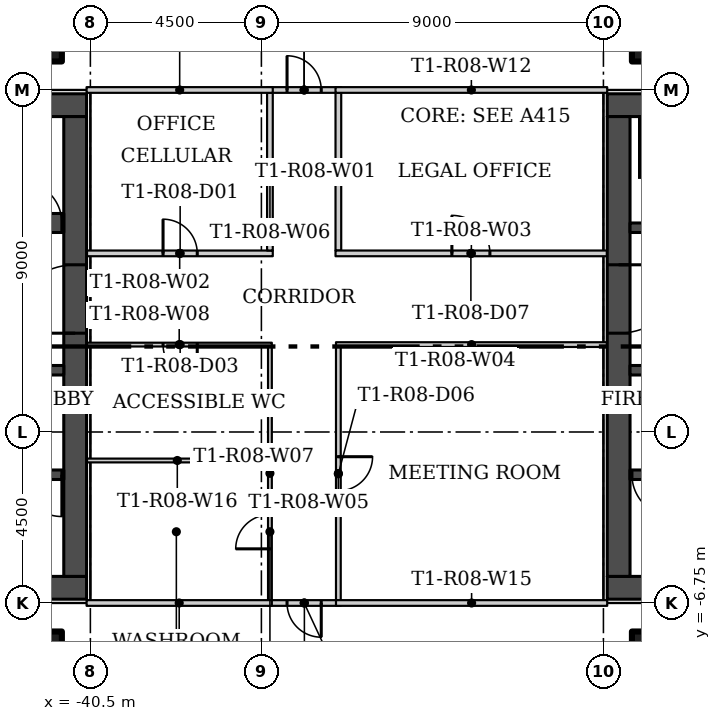
"""IFC4 building model, lengths in metres.
Left out: names, types, materials, properties, quantities, classifications, styles, units other than length and angle.
Written with IfcOpenShell. Run it as: python <this file> out.ifc"""

import sys

from ifc_helpers import new_model, si_unit, direction, frame, frame_2d, origin, origin_2d, place, context, subcontext, project, spatial, rectangle, hollow_rectangle, extrude, element, fill, save


model = new_model("IFC4")
c1 = context("Model", 3, precision=1e-05, world=origin(), true_north=direction((0.0, 1.0)))
c2 = subcontext(c1, "Body", "Model", "MODEL_VIEW")
j1 = project(units=[si_unit("LENGTHUNIT", "METRE"), si_unit("PLANEANGLEUNIT", "RADIAN")], contexts=[c1])
p1 = place(None, origin())
s1 = spatial("IfcSite", under=j1, at=p1, CompositionType="ELEMENT")
p2 = place(p1, origin())
s2 = spatial("IfcBuilding", under=s1, at=p2, CompositionType="ELEMENT")
p3 = place(p2, frame((0.0, 0.0, 85.8)))
s3 = spatial("IfcBuildingStorey", under=s2, at=p3, CompositionType="ELEMENT", Elevation=85.8)
for number, where in (
    (1, (-25.625, 8.125, 0.0)),
    (2, (-25.625, -8.125, 0.0)),
    (3, (-41.875, 8.125, 0.0)),
    (4, (-41.875, -8.125, 0.0)),
):
    element("IfcColumn", number, at=place(p3, frame(where)), inside=s3, PredefinedType="COLUMN", context=c2, shape_type="SweptSolid", body=[
        extrude(hollow_rectangle(XDim=1.25, YDim=1.25, WallThickness=0.05, at=origin_2d()), origin(), (0.0, 0.0, 1.0), 3.55),
    ])
p4 = place(p3, frame((-33.975, 6.675, 0.0), z_axis=(0.0, 0.0, 1.0), x_axis=(0.0, -1.0, 0.0)))
e5 = element("IfcWall", 5, at=p4, inside=s3, PredefinedType="PARTITIONING", context=c2, shape_type="SweptSolid", body=[
    extrude(rectangle(XDim=4.15, YDim=0.15, at=frame_2d((2.075, 0.0))), origin(), (0.0, 0.0, 1.0), 3.55),
])
p5 = place(p3, frame((-40.6, 2.45, 0.0)))
e6 = element("IfcWall", 6, at=p5, inside=s3, PredefinedType="PARTITIONING", context=c2, shape_type="SweptSolid", body=[
    extrude(rectangle(XDim=4.9, YDim=0.15, at=frame_2d((2.45, 0.0))), origin(), (0.0, 0.0, 1.0), 3.55),
])
p6 = place(p5, frame((2.012, 0.0, 0.0)))
e7 = element("IfcOpeningElement", 7, at=p6, cuts=e6, PredefinedType="OPENING", context=c2, shape_type="SweptSolid", body=[
    extrude(rectangle(XDim=0.9, YDim=2.1, at=frame_2d((0.45, 1.05))), frame((0.0, 0.085, 0.0), z_axis=(0.0, -1.0, 0.0), x_axis=(1.0, 0.0, 0.0)), (0.0, 0.0, 1.0), 0.17),
])
p7 = place(p3, frame((-34.05, 2.45, 0.0)))
e8 = element("IfcWall", 8, at=p7, inside=s3, PredefinedType="PARTITIONING", context=c2, shape_type="SweptSolid", body=[
    extrude(rectangle(XDim=7.15, YDim=0.15, at=frame_2d((3.575, 0.0))), origin(), (0.0, 0.0, 1.0), 3.55),
])
p8 = place(p7, frame((3.062, 0.0, 0.0)))
e9 = element("IfcOpeningElement", 9, at=p8, cuts=e8, PredefinedType="OPENING", context=c2, shape_type="SweptSolid", body=[
    extrude(rectangle(XDim=1.0, YDim=2.4, at=frame_2d((0.5, 1.2))), frame((0.0, 0.085, 0.0), z_axis=(0.0, -1.0, 0.0), x_axis=(1.0, 0.0, 0.0)), (0.0, 0.0, 1.0), 0.17),
])
p9 = place(p3, frame((-26.9, 0.05, 0.0), z_axis=(0.0, 0.0, 1.0), x_axis=(-1.0, 0.0, 0.0)))
e10 = element("IfcWall", 10, at=p9, inside=s3, PredefinedType="PARTITIONING", context=c2, shape_type="SweptSolid", body=[
    extrude(rectangle(XDim=7.137, YDim=0.125, at=frame_2d((3.569, 0.0))), origin(), (0.0, 0.0, 1.0), 3.55),
])
p10 = place(p3, frame((-33.975, -0.013, 0.0), z_axis=(0.0, 0.0, 1.0), x_axis=(0.0, -1.0, 0.0)))
e11 = element("IfcWall", 11, at=p10, inside=s3, PredefinedType="PARTITIONING", context=c2, shape_type="SweptSolid", body=[
    extrude(rectangle(XDim=6.662, YDim=0.125, at=frame_2d((3.331, 0.0))), origin(), (0.0, 0.0, 1.0), 3.55),
])
p11 = place(p10, frame((2.887, 0.0, 0.0)))
e12 = element("IfcOpeningElement", 12, at=p11, cuts=e11, PredefinedType="OPENING", context=c2, shape_type="SweptSolid", body=[
    extrude(rectangle(XDim=0.9, YDim=2.1, at=frame_2d((0.45, 1.05))), frame((0.0, 0.073, 0.0), z_axis=(0.0, -1.0, 0.0), x_axis=(1.0, 0.0, 0.0)), (0.0, 0.0, 1.0), 0.145),
])
p12 = place(p3, frame((-35.775, 2.525, 0.0), z_axis=(0.0, 0.0, 1.0), x_axis=(0.0, 1.0, 0.0)))
e13 = element("IfcWall", 13, at=p12, inside=s3, PredefinedType="PARTITIONING", context=c2, shape_type="SweptSolid", body=[
    extrude(rectangle(XDim=4.15, YDim=0.15, at=frame_2d((2.075, 0.0))), origin(), (0.0, 0.0, 1.0), 3.55),
])
p13 = place(p3, frame((-35.775, -6.675, 0.0), z_axis=(0.0, 0.0, 1.0), x_axis=(0.0, 1.0, 0.0)))
e14 = element("IfcWall", 14, at=p13, inside=s3, PredefinedType="PARTITIONING", context=c2, shape_type="SweptSolid", body=[
    extrude(rectangle(XDim=6.675, YDim=0.1, at=frame_2d((3.337, 0.0))), origin(), (0.0, 0.0, 1.0), 3.55),
])
p14 = place(p13, frame((1.35, 0.0, 0.0)))
e15 = element("IfcOpeningElement", 15, at=p14, cuts=e14, PredefinedType="OPENING", context=c2, shape_type="SweptSolid", body=[
    extrude(rectangle(XDim=0.9, YDim=2.1, at=frame_2d((0.45, 1.05))), frame((0.0, 0.06, 0.0), z_axis=(0.0, -1.0, 0.0), x_axis=(1.0, 0.0, 0.0)), (0.0, 0.0, 1.0), 0.12),
])
p15 = place(p3, frame((-35.725, 0.05, 0.0), z_axis=(0.0, 0.0, 1.0), x_axis=(-1.0, 0.0, 0.0)))
e16 = element("IfcWall", 16, at=p15, inside=s3, PredefinedType="PARTITIONING", context=c2, shape_type="SweptSolid", body=[
    extrude(rectangle(XDim=4.875, YDim=0.1, at=frame_2d((2.438, 0.0))), origin(), (0.0, 0.0, 1.0), 3.55),
])
p16 = place(p15, frame((1.962, 0.0, 0.0)))
e17 = element("IfcOpeningElement", 17, at=p16, cuts=e16, PredefinedType="OPENING", context=c2, shape_type="SweptSolid", body=[
    extrude(rectangle(XDim=0.9, YDim=2.1, at=frame_2d((0.45, 1.05))), frame((0.0, 0.06, 0.0), z_axis=(0.0, -1.0, 0.0), x_axis=(1.0, 0.0, 0.0)), (0.0, 0.0, 1.0), 0.12),
])
p17 = place(p3, frame((-35.85, 6.75, 0.0)))
e18 = element("IfcWall", 18, at=p17, inside=s3, PredefinedType="PARTITIONING", context=c2, shape_type="SweptSolid", body=[
    extrude(rectangle(XDim=1.951, YDim=0.15, at=frame_2d((0.975, 0.0))), origin(), (0.0, 0.0, 1.0), 3.55),
])
p18 = place(p17, frame((0.525, 0.0, 0.0)))
e19 = element("IfcOpeningElement", 19, at=p18, cuts=e18, PredefinedType="OPENING", context=c2, shape_type="SweptSolid", body=[
    extrude(rectangle(XDim=0.9, YDim=2.1, at=frame_2d((0.45, 1.05))), frame((0.0, 0.085, 0.0), z_axis=(0.0, -1.0, 0.0), x_axis=(1.0, 0.0, 0.0)), (0.0, 0.0, 1.0), 0.17),
])
p19 = place(p3, frame((-33.912, -6.75, 0.0), z_axis=(0.0, 0.0, 1.0), x_axis=(-1.0, 0.0, 0.0)))
e20 = element("IfcWall", 20, at=p19, inside=s3, PredefinedType="PARTITIONING", context=c2, shape_type="SweptSolid", body=[
    extrude(rectangle(XDim=1.913, YDim=0.15, at=frame_2d((0.957, 0.0))), origin(), (0.0, 0.0, 1.0), 3.55),
])
p20 = place(p19, frame((0.513, 0.0, 0.0)))
e21 = element("IfcOpeningElement", 21, at=p20, cuts=e20, PredefinedType="OPENING", context=c2, shape_type="SweptSolid", body=[
    extrude(rectangle(XDim=0.9, YDim=2.1, at=frame_2d((0.45, 1.05))), frame((0.0, 0.085, 0.0), z_axis=(0.0, -1.0, 0.0), x_axis=(1.0, 0.0, 0.0)), (0.0, 0.0, 1.0), 0.17),
])
p21 = place(p3, frame((-26.9, 6.75, 0.0), z_axis=(0.0, 0.0, 1.0), x_axis=(-1.0, 0.0, 0.0)))
e22 = element("IfcWall", 22, at=p21, inside=s3, PredefinedType="PARTITIONING", context=c2, shape_type="SweptSolid", body=[
    extrude(rectangle(XDim=7.15, YDim=0.15, at=frame_2d((3.575, 0.0))), origin(), (0.0, 0.0, 1.0), 3.55),
])
p22 = place(p3, frame((-35.7, 6.75, 0.0), z_axis=(0.0, 0.0, 1.0), x_axis=(-1.0, 0.0, 0.0)))
e23 = element("IfcWall", 23, at=p22, inside=s3, PredefinedType="PARTITIONING", context=c2, shape_type="SweptSolid", body=[
    extrude(rectangle(XDim=4.9, YDim=0.15, at=frame_2d((2.45, 0.0))), origin(), (0.0, 0.0, 1.0), 3.55),
])
p23 = place(p3, frame((-40.6, -6.75, 0.0)))
e24 = element("IfcWall", 24, at=p23, inside=s3, PredefinedType="PARTITIONING", context=c2, shape_type="SweptSolid", body=[
    extrude(rectangle(XDim=4.875, YDim=0.15, at=frame_2d((2.438, 0.0))), origin(), (0.0, 0.0, 1.0), 3.55),
])
p24 = place(p3, frame((-34.037, -6.75, 0.0)))
e25 = element("IfcWall", 25, at=p24, inside=s3, PredefinedType="PARTITIONING", context=c2, shape_type="SweptSolid", body=[
    extrude(rectangle(XDim=7.137, YDim=0.15, at=frame_2d((3.569, 0.0))), origin(), (0.0, 0.0, 1.0), 3.55),
])
p25 = place(p3, frame((-35.825, -3.0, 0.0), z_axis=(0.0, 0.0, 1.0), x_axis=(-1.0, 0.0, 0.0)))
e26 = element("IfcWall", 26, at=p25, inside=s3, PredefinedType="PARTITIONING", context=c2, shape_type="SweptSolid", body=[
    extrude(rectangle(XDim=4.775, YDim=0.1, at=frame_2d((2.387, 0.0))), origin(), (0.0, 0.0, 1.0), 3.55),
])
for number, where in (
    (27, (-26.9, -6.35, 0.0)),
    (28, (-26.9, 6.35, 0.0)),
):
    element("IfcWall", number, at=place(p3, frame(where)), inside=s3, PredefinedType="SHEAR", context=c2, shape_type="SweptSolid", body=[
        extrude(rectangle(XDim=13.3, YDim=0.6, at=frame_2d((6.65, 0.0))), origin(), (0.0, 0.0, 1.0), 3.55),
    ])
p26 = place(p3, frame((-26.6, 6.05, 0.0), z_axis=(0.0, 0.0, 1.0), x_axis=(0.0, -1.0, 0.0)))
e29 = element("IfcWall", 29, at=p26, inside=s3, PredefinedType="SHEAR", context=c2, shape_type="SweptSolid", body=[
    extrude(rectangle(XDim=12.1, YDim=0.6, at=frame_2d((6.05, 0.0))), origin(), (0.0, 0.0, 1.0), 3.55),
])
p27 = place(p26, frame((3.9, 0.0, 0.0)))
e30 = element("IfcOpeningElement", 30, at=p27, cuts=e29, PredefinedType="OPENING", context=c2, shape_type="SweptSolid", body=[
    extrude(rectangle(XDim=1.8, YDim=2.4, at=frame_2d((0.9, 1.2))), frame((0.0, 0.31, 0.0), z_axis=(0.0, -1.0, 0.0), x_axis=(1.0, 0.0, 0.0)), (0.0, 0.0, 1.0), 0.62),
])
p28 = place(p3, frame((-14.2, -3.375, 0.0), z_axis=(0.0, 0.0, 1.0), x_axis=(-1.0, 0.0, 0.0)))
e31 = element("IfcWall", 31, at=p28, inside=s3, PredefinedType="SHEAR", context=c2, shape_type="SweptSolid", body=[
    extrude(rectangle(XDim=12.1, YDim=0.25, at=frame_2d((6.05, 0.0))), origin(), (0.0, 0.0, 1.0), 3.55),
])
p29 = place(p28, frame((10.95, 0.0, 0.0)))
e32 = element("IfcOpeningElement", 32, at=p29, cuts=e31, PredefinedType="OPENING", context=c2, shape_type="SweptSolid", body=[
    extrude(rectangle(XDim=1.1, YDim=2.1, at=frame_2d((0.55, 1.05))), frame((0.0, 0.135, 0.0), z_axis=(0.0, -1.0, 0.0), x_axis=(1.0, 0.0, 0.0)), (0.0, 0.0, 1.0), 0.27),
])
p30 = place(p3, frame((-14.2, -0.625, 0.0), z_axis=(0.0, 0.0, 1.0), x_axis=(-1.0, 0.0, 0.0)))
e33 = element("IfcWall", 33, at=p30, inside=s3, PredefinedType="SHEAR", context=c2, shape_type="SweptSolid", body=[
    extrude(rectangle(XDim=12.1, YDim=0.25, at=frame_2d((6.05, 0.0))), origin(), (0.0, 0.0, 1.0), 3.55),
])
p31 = place(p30, frame((8.65, 0.0, 0.0)))
e34 = element("IfcOpeningElement", 34, at=p31, cuts=e33, PredefinedType="OPENING", context=c2, shape_type="SweptSolid", body=[
    extrude(rectangle(XDim=1.2, YDim=2.1, at=frame_2d((0.6, 1.05))), frame((0.0, 0.135, 0.0), z_axis=(0.0, -1.0, 0.0), x_axis=(1.0, 0.0, 0.0)), (0.0, 0.0, 1.0), 0.27),
])
p32 = place(p30, frame((2.0, 0.0, 0.0)))
e35 = element("IfcOpeningElement", 35, at=p32, cuts=e33, PredefinedType="OPENING", context=c2, shape_type="SweptSolid", body=[
    extrude(rectangle(XDim=0.9, YDim=2.1, at=frame_2d((0.45, 1.05))), frame((0.0, 0.135, 0.0), z_axis=(0.0, -1.0, 0.0), x_axis=(1.0, 0.0, 0.0)), (0.0, 0.0, 1.0), 0.27),
])
p33 = place(p30, frame((0.375, 0.0, 0.0)))
e36 = element("IfcOpeningElement", 36, at=p33, cuts=e33, PredefinedType="OPENING", context=c2, shape_type="SweptSolid", body=[
    extrude(rectangle(XDim=0.9, YDim=2.1, at=frame_2d((0.45, 1.05))), frame((0.0, 0.135, 0.0), z_axis=(0.0, -1.0, 0.0), x_axis=(1.0, 0.0, 0.0)), (0.0, 0.0, 1.0), 0.27),
])
p34 = place(p3, frame((-26.3, 3.125, 0.0)))
e37 = element("IfcWall", 37, at=p34, inside=s3, PredefinedType="SHEAR", context=c2, shape_type="SweptSolid", body=[
    extrude(rectangle(XDim=12.1, YDim=0.25, at=frame_2d((6.05, 0.0))), origin(), (0.0, 0.0, 1.0), 3.55),
])
p35 = place(p34, frame((0.85, 0.0, 0.0)))
e38 = element("IfcOpeningElement", 38, at=p35, cuts=e37, PredefinedType="OPENING", context=c2, shape_type="SweptSolid", body=[
    extrude(rectangle(XDim=1.1, YDim=2.1, at=frame_2d((0.55, 1.05))), frame((0.0, 0.135, 0.0), z_axis=(0.0, -1.0, 0.0), x_axis=(1.0, 0.0, 0.0)), (0.0, 0.0, 1.0), 0.27),
])
p36 = place(p34, frame((3.9, 0.0, 0.0)))
e39 = element("IfcOpeningElement", 39, at=p36, cuts=e37, PredefinedType="OPENING", context=c2, shape_type="SweptSolid", body=[
    extrude(rectangle(XDim=1.1, YDim=2.1, at=frame_2d((0.55, 1.05))), frame((0.0, 0.135, 0.0), z_axis=(0.0, -1.0, 0.0), x_axis=(1.0, 0.0, 0.0)), (0.0, 0.0, 1.0), 0.27),
])
for number, where, z_axis, x_axis in (
    (40, (-40.6, -6.35, 0.0), (0.0, 0.0, 1.0), (-1.0, 0.0, 0.0)),
    (41, (-40.6, 6.35, 0.0), (0.0, 0.0, 1.0), (-1.0, 0.0, 0.0)),
):
    element("IfcWall", number, at=place(p3, frame(where, z_axis=z_axis, x_axis=x_axis)), inside=s3, PredefinedType="SHEAR", context=c2, shape_type="SweptSolid", body=[
        extrude(rectangle(XDim=13.3, YDim=0.6, at=frame_2d((6.65, 0.0))), origin(), (0.0, 0.0, 1.0), 3.55),
    ])
p37 = place(p3, frame((-40.9, -6.05, 0.0), z_axis=(0.0, 0.0, 1.0), x_axis=(0.0, 1.0, 0.0)))
e42 = element("IfcWall", 42, at=p37, inside=s3, PredefinedType="SHEAR", context=c2, shape_type="SweptSolid", body=[
    extrude(rectangle(XDim=12.1, YDim=0.6, at=frame_2d((6.05, 0.0))), origin(), (0.0, 0.0, 1.0), 3.55),
])
p38 = place(p37, frame((6.4, 0.0, 0.0)))
e43 = element("IfcOpeningElement", 43, at=p38, cuts=e42, PredefinedType="OPENING", context=c2, shape_type="SweptSolid", body=[
    extrude(rectangle(XDim=1.8, YDim=2.4, at=frame_2d((0.9, 1.2))), frame((0.0, 0.31, 0.0), z_axis=(0.0, -1.0, 0.0), x_axis=(1.0, 0.0, 0.0)), (0.0, 0.0, 1.0), 0.62),
])
p39 = place(p3, frame((-41.2, -3.375, 0.0), z_axis=(0.0, 0.0, 1.0), x_axis=(-1.0, 0.0, 0.0)))
e44 = element("IfcWall", 44, at=p39, inside=s3, PredefinedType="SHEAR", context=c2, shape_type="SweptSolid", body=[
    extrude(rectangle(XDim=12.1, YDim=0.25, at=frame_2d((6.05, 0.0))), origin(), (0.0, 0.0, 1.0), 3.55),
])
p40 = place(p39, frame((0.05, 0.0, 0.0)))
e45 = element("IfcOpeningElement", 45, at=p40, cuts=e44, PredefinedType="OPENING", context=c2, shape_type="SweptSolid", body=[
    extrude(rectangle(XDim=1.1, YDim=2.1, at=frame_2d((0.55, 1.05))), frame((0.0, 0.135, 0.0), z_axis=(0.0, -1.0, 0.0), x_axis=(1.0, 0.0, 0.0)), (0.0, 0.0, 1.0), 0.27),
])
p41 = place(p3, frame((-41.2, -0.625, 0.0), z_axis=(0.0, 0.0, 1.0), x_axis=(-1.0, 0.0, 0.0)))
e46 = element("IfcWall", 46, at=p41, inside=s3, PredefinedType="SHEAR", context=c2, shape_type="SweptSolid", body=[
    extrude(rectangle(XDim=12.1, YDim=0.25, at=frame_2d((6.05, 0.0))), origin(), (0.0, 0.0, 1.0), 3.55),
])
p42 = place(p41, frame((2.25, 0.0, 0.0)))
e47 = element("IfcOpeningElement", 47, at=p42, cuts=e46, PredefinedType="OPENING", context=c2, shape_type="SweptSolid", body=[
    extrude(rectangle(XDim=1.2, YDim=2.1, at=frame_2d((0.6, 1.05))), frame((0.0, 0.135, 0.0), z_axis=(0.0, -1.0, 0.0), x_axis=(1.0, 0.0, 0.0)), (0.0, 0.0, 1.0), 0.27),
])
p43 = place(p41, frame((9.05, 0.0, 0.0)))
e48 = element("IfcOpeningElement", 48, at=p43, cuts=e46, PredefinedType="OPENING", context=c2, shape_type="SweptSolid", body=[
    extrude(rectangle(XDim=0.9, YDim=2.1, at=frame_2d((0.45, 1.05))), frame((0.0, 0.135, 0.0), z_axis=(0.0, -1.0, 0.0), x_axis=(1.0, 0.0, 0.0)), (0.0, 0.0, 1.0), 0.27),
])
p44 = place(p41, frame((10.675, 0.0, 0.0)))
e49 = element("IfcOpeningElement", 49, at=p44, cuts=e46, PredefinedType="OPENING", context=c2, shape_type="SweptSolid", body=[
    extrude(rectangle(XDim=0.9, YDim=2.1, at=frame_2d((0.45, 1.05))), frame((0.0, 0.135, 0.0), z_axis=(0.0, -1.0, 0.0), x_axis=(1.0, 0.0, 0.0)), (0.0, 0.0, 1.0), 0.27),
])
p45 = place(p3, frame((-48.5, 3.25, 0.0)))
e50 = element("IfcWall", 50, at=p45, inside=s3, PredefinedType="SHEAR", context=c2, shape_type="SweptSolid", body=[
    extrude(rectangle(XDim=7.3, YDim=0.5, at=frame_2d((3.65, 0.0))), origin(), (0.0, 0.0, 1.0), 3.55),
])
p46 = place(p45, frame((6.15, 0.0, 0.0)))
e51 = element("IfcOpeningElement", 51, at=p46, cuts=e50, PredefinedType="OPENING", context=c2, shape_type="SweptSolid", body=[
    extrude(rectangle(XDim=1.1, YDim=2.1, at=frame_2d((0.55, 1.05))), frame((0.0, 0.26, 0.0), z_axis=(0.0, -1.0, 0.0), x_axis=(1.0, 0.0, 0.0)), (0.0, 0.0, 1.0), 0.52),
])
p47 = place(p6, origin())
e52 = element("IfcDoor", 52, at=p47, inside=s3, OperationType="SINGLE_SWING_LEFT", PredefinedType="DOOR", context=c2, shape_type="SweptSolid", body=[
    extrude(rectangle(XDim=0.9, YDim=2.1, at=frame_2d((0.45, 1.05))), frame((0.0, 0.025, 0.0), z_axis=(0.0, -1.0, 0.0), x_axis=(1.0, 0.0, 0.0)), (0.0, 0.0, 1.0), 0.05),
])
fill(e7, e52)
p48 = place(p14, origin())
e53 = element("IfcDoor", 53, at=p48, inside=s3, OperationType="SINGLE_SWING_RIGHT", PredefinedType="DOOR", context=c2, shape_type="SweptSolid", body=[
    extrude(rectangle(XDim=0.9, YDim=2.1, at=frame_2d((0.45, 1.05))), frame((0.0, 0.025, 0.0), z_axis=(0.0, -1.0, 0.0), x_axis=(1.0, 0.0, 0.0)), (0.0, 0.0, 1.0), 0.05),
])
fill(e15, e53)
p49 = place(p16, origin())
e54 = element("IfcDoor", 54, at=p49, inside=s3, OperationType="SINGLE_SWING_RIGHT", PredefinedType="DOOR", context=c2, shape_type="SweptSolid", body=[
    extrude(rectangle(XDim=0.9, YDim=2.1, at=frame_2d((0.45, 1.05))), frame((0.0, 0.025, 0.0), z_axis=(0.0, -1.0, 0.0), x_axis=(1.0, 0.0, 0.0)), (0.0, 0.0, 1.0), 0.05),
])
fill(e17, e54)
p50 = place(p18, origin())
e55 = element("IfcDoor", 55, at=p50, inside=s3, OperationType="SINGLE_SWING_LEFT", PredefinedType="DOOR", context=c2, shape_type="SweptSolid", body=[
    extrude(rectangle(XDim=0.9, YDim=2.1, at=frame_2d((0.45, 1.05))), frame((0.0, 0.025, 0.0), z_axis=(0.0, -1.0, 0.0), x_axis=(1.0, 0.0, 0.0)), (0.0, 0.0, 1.0), 0.05),
])
fill(e19, e55)
p51 = place(p20, origin())
e56 = element("IfcDoor", 56, at=p51, inside=s3, OperationType="SINGLE_SWING_RIGHT", PredefinedType="DOOR", context=c2, shape_type="SweptSolid", body=[
    extrude(rectangle(XDim=0.9, YDim=2.1, at=frame_2d((0.45, 1.05))), frame((0.0, 0.025, 0.0), z_axis=(0.0, -1.0, 0.0), x_axis=(1.0, 0.0, 0.0)), (0.0, 0.0, 1.0), 0.05),
])
fill(e21, e56)
p52 = place(p11, origin())
e57 = element("IfcDoor", 57, at=p52, inside=s3, OperationType="SINGLE_SWING_RIGHT", PredefinedType="DOOR", context=c2, shape_type="SweptSolid", body=[
    extrude(rectangle(XDim=0.9, YDim=2.1, at=frame_2d((0.45, 1.05))), frame((0.0, 0.025, 0.0), z_axis=(0.0, -1.0, 0.0), x_axis=(1.0, 0.0, 0.0)), (0.0, 0.0, 1.0), 0.05),
])
fill(e12, e57)
p53 = place(p8, origin())
e58 = element("IfcDoor", 58, at=p53, inside=s3, OperationType="SINGLE_SWING_RIGHT", PredefinedType="DOOR", context=c2, shape_type="SweptSolid", body=[
    extrude(rectangle(XDim=1.0, YDim=2.4, at=frame_2d((0.5, 1.2))), frame((0.0, 0.025, 0.0), z_axis=(0.0, -1.0, 0.0), x_axis=(1.0, 0.0, 0.0)), (0.0, 0.0, 1.0), 0.05),
])
fill(e9, e58)
p54 = place(p27, origin())
e59 = element("IfcDoor", 59, at=p54, inside=s3, OperationType="DOUBLE_DOOR_SINGLE_SWING", PredefinedType="DOOR", context=c2, shape_type="SweptSolid", body=[
    extrude(rectangle(XDim=1.8, YDim=2.4, at=frame_2d((0.9, 1.2))), frame((0.0, 0.025, 0.0), z_axis=(0.0, -1.0, 0.0), x_axis=(1.0, 0.0, 0.0)), (0.0, 0.0, 1.0), 0.05),
])
fill(e30, e59)
p55 = place(p29, origin())
e60 = element("IfcDoor", 60, at=p55, inside=s3, OperationType="SINGLE_SWING_RIGHT", PredefinedType="DOOR", context=c2, shape_type="SweptSolid", body=[
    extrude(rectangle(XDim=1.1, YDim=2.1, at=frame_2d((0.55, 1.05))), frame((0.0, 0.025, 0.0), z_axis=(0.0, -1.0, 0.0), x_axis=(1.0, 0.0, 0.0)), (0.0, 0.0, 1.0), 0.05),
])
fill(e32, e60)
p56 = place(p38, origin())
e61 = element("IfcDoor", 61, at=p56, inside=s3, OperationType="DOUBLE_DOOR_SINGLE_SWING", PredefinedType="DOOR", context=c2, shape_type="SweptSolid", body=[
    extrude(rectangle(XDim=1.8, YDim=2.4, at=frame_2d((0.9, 1.2))), frame((0.0, 0.025, 0.0), z_axis=(0.0, -1.0, 0.0), x_axis=(1.0, 0.0, 0.0)), (0.0, 0.0, 1.0), 0.05),
])
fill(e43, e61)
p57 = place(p40, origin())
e62 = element("IfcDoor", 62, at=p57, inside=s3, OperationType="SINGLE_SWING_LEFT", PredefinedType="DOOR", context=c2, shape_type="SweptSolid", body=[
    extrude(rectangle(XDim=1.1, YDim=2.1, at=frame_2d((0.55, 1.05))), frame((0.0, 0.025, 0.0), z_axis=(0.0, -1.0, 0.0), x_axis=(1.0, 0.0, 0.0)), (0.0, 0.0, 1.0), 0.05),
])
fill(e45, e62)
p58 = place(p46, origin())
e63 = element("IfcDoor", 63, at=p58, inside=s3, OperationType="SINGLE_SWING_RIGHT", PredefinedType="DOOR", context=c2, shape_type="SweptSolid", body=[
    extrude(rectangle(XDim=1.1, YDim=2.1, at=frame_2d((0.55, 1.05))), frame((0.0, 0.025, 0.0), z_axis=(0.0, -1.0, 0.0), x_axis=(1.0, 0.0, 0.0)), (0.0, 0.0, 1.0), 0.05),
])
fill(e51, e63)
save(model, sys.argv[1])
